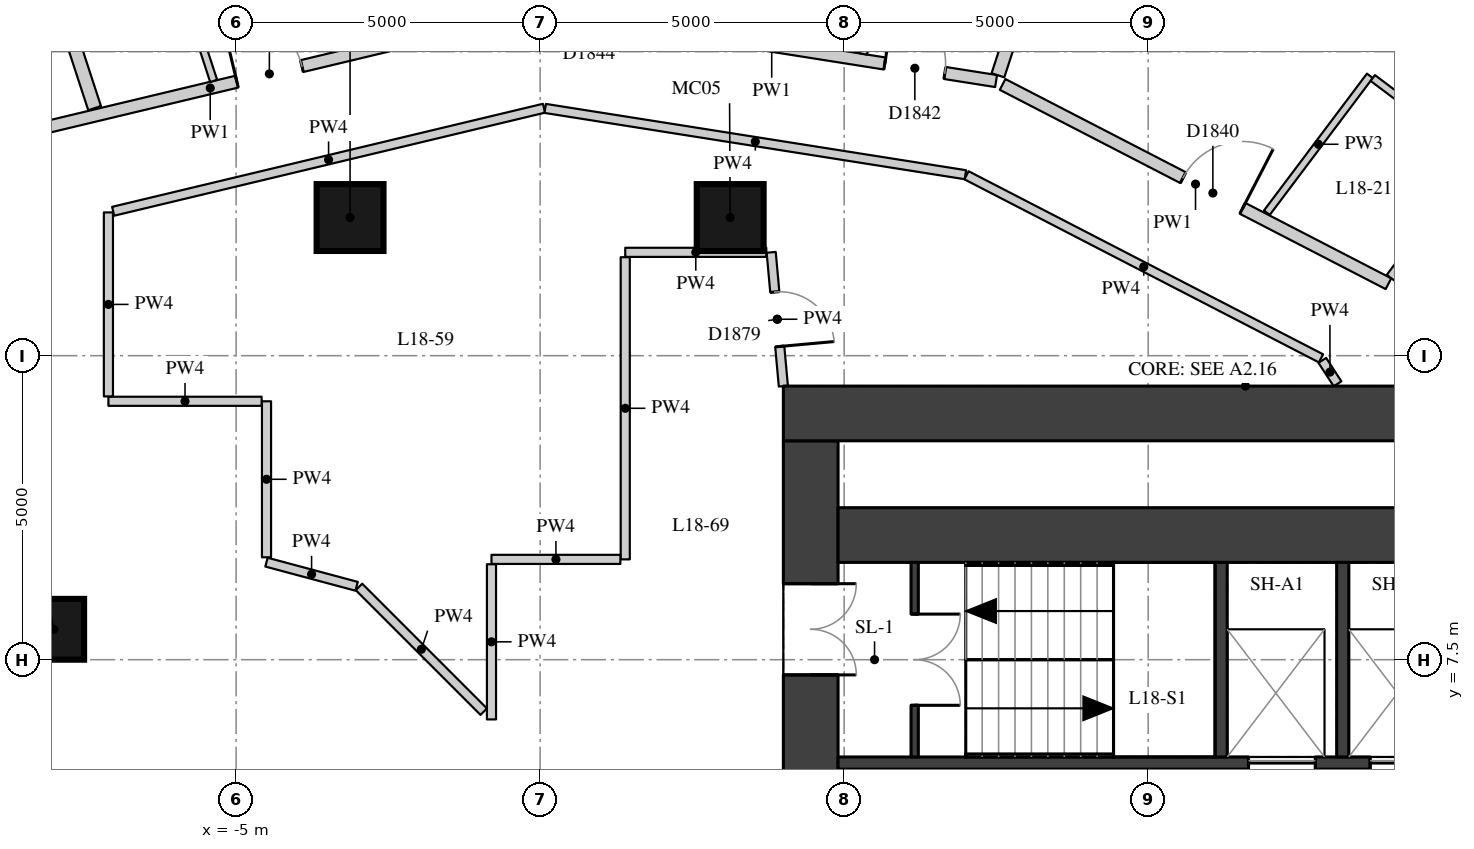
"""IFC4 building model, lengths in metres.
Left out: names, types, materials, properties, quantities, classifications, styles, units other than length and angle.
Written with IfcOpenShell. Run it as: python <this file> out.ifc"""

import sys

from ifc_helpers import new_model, si_unit, direction, frame, frame_2d, origin, origin_2d, place, context, subcontext, project, spatial, rectangle, extrude, element, fill, save


model = new_model("IFC4")
c1 = context("Model", 3, precision=1e-05, world=origin(), true_north=direction((0.0, 1.0)))
c2 = subcontext(c1, "Body", "Model", "MODEL_VIEW")
j1 = project(units=[si_unit("LENGTHUNIT", "METRE"), si_unit("PLANEANGLEUNIT", "RADIAN")], contexts=[c1])
p1 = place(None, origin())
s1 = spatial("IfcSite", under=j1, at=p1, CompositionType="ELEMENT")
p2 = place(p1, origin())
s2 = spatial("IfcBuilding", under=s1, at=p2, CompositionType="ELEMENT")
p3 = place(p2, frame((0.0, 0.0, 67.9)))
s3 = spatial("IfcBuildingStorey", under=s2, at=p3, CompositionType="ELEMENT", Elevation=67.9)
p4 = place(p3, frame((-8.0, 8.0, 0.0), z_axis=(0.0, 0.0, 1.0), x_axis=(1.0, 0.0, 0.0)))
e1 = element("IfcColumn", 1, at=p4, inside=s3, PredefinedType="COLUMN", context=c2, shape_type="SweptSolid", body=[
    extrude(rectangle(XDim=1.0, YDim=1.0, at=origin_2d()), origin(), (0.0, 0.0, 1.0), 3.3),
])
for number, where, z_axis, x_axis in (
    (2, (3.126, 14.772, 0.0), (0.0, 0.0, 1.0), (1.0, 0.0, 0.0)),
    (3, (-3.126, 14.772, 0.0), (0.0, 0.0, 1.0), (1.0, 0.0, 0.0)),
):
    element("IfcColumn", number, at=place(p3, frame(where, z_axis=z_axis, x_axis=x_axis)), inside=s3, PredefinedType="COLUMN", context=c2, shape_type="SweptSolid", body=[
        extrude(rectangle(XDim=1.1, YDim=1.1, at=origin_2d()), origin(), (0.0, 0.0, 1.0), 3.3),
    ])
p5 = place(p3, frame((4.45, -11.1, 0.0), z_axis=(0.0, 0.0, 1.0), x_axis=(0.0, 1.0, 0.0)))
e4 = element("IfcWall", 4, at=p5, inside=s3, PredefinedType="SHEAR", context=c2, shape_type="SweptSolid", body=[
    extrude(rectangle(XDim=22.2, YDim=0.9, at=frame_2d((11.1, 0.0))), origin(), (0.0, 0.0, 1.0), 3.02),
])
p6 = place(p5, frame((2.35, 0.0, 0.0)))
e5 = element("IfcOpeningElement", 5, at=p6, cuts=e4, PredefinedType="OPENING", context=c2, shape_type="SweptSolid", body=[
    extrude(rectangle(XDim=1.5, YDim=2.1, at=frame_2d((0.75, 1.05))), frame((0.0, 0.46, 0.0), z_axis=(0.0, -1.0, 0.0), x_axis=(1.0, 0.0, 0.0)), (0.0, 0.0, 1.0), 0.92),
])
p7 = place(p5, frame((5.45, 0.0, 0.0)))
e6 = element("IfcOpeningElement", 6, at=p7, cuts=e4, PredefinedType="OPENING", context=c2, shape_type="SweptSolid", body=[
    extrude(rectangle(XDim=1.8, YDim=2.1, at=frame_2d((0.9, 1.05))), frame((0.0, 0.46, 0.0), z_axis=(0.0, -1.0, 0.0), x_axis=(1.0, 0.0, 0.0)), (0.0, 0.0, 1.0), 0.92),
])
p8 = place(p5, frame((7.95, 0.0, 0.0)))
e7 = element("IfcOpeningElement", 7, at=p8, cuts=e4, PredefinedType="OPENING", context=c2, shape_type="SweptSolid", body=[
    extrude(rectangle(XDim=1.1, YDim=2.1, at=frame_2d((0.55, 1.05))), frame((0.0, 0.46, 0.0), z_axis=(0.0, -1.0, 0.0), x_axis=(1.0, 0.0, 0.0)), (0.0, 0.0, 1.0), 0.92),
])
p9 = place(p5, frame((10.6, 0.0, 0.0)))
e8 = element("IfcOpeningElement", 8, at=p9, cuts=e4, PredefinedType="OPENING", context=c2, shape_type="SweptSolid", body=[
    extrude(rectangle(XDim=1.0, YDim=2.1, at=frame_2d((0.5, 1.05))), frame((0.0, 0.46, 0.0), z_axis=(0.0, -1.0, 0.0), x_axis=(1.0, 0.0, 0.0)), (0.0, 0.0, 1.0), 0.92),
])
p10 = place(p5, frame((13.15, 0.0, 0.0)))
e9 = element("IfcOpeningElement", 9, at=p10, cuts=e4, PredefinedType="OPENING", context=c2, shape_type="SweptSolid", body=[
    extrude(rectangle(XDim=1.1, YDim=2.1, at=frame_2d((0.55, 1.05))), frame((0.0, 0.46, 0.0), z_axis=(0.0, -1.0, 0.0), x_axis=(1.0, 0.0, 0.0)), (0.0, 0.0, 1.0), 0.92),
])
p11 = place(p5, frame((14.95, 0.0, 0.0)))
e10 = element("IfcOpeningElement", 10, at=p11, cuts=e4, PredefinedType="OPENING", context=c2, shape_type="SweptSolid", body=[
    extrude(rectangle(XDim=1.8, YDim=2.1, at=frame_2d((0.9, 1.05))), frame((0.0, 0.46, 0.0), z_axis=(0.0, -1.0, 0.0), x_axis=(1.0, 0.0, 0.0)), (0.0, 0.0, 1.0), 0.92),
])
p12 = place(p5, frame((18.35, 0.0, 0.0)))
e11 = element("IfcOpeningElement", 11, at=p12, cuts=e4, PredefinedType="OPENING", context=c2, shape_type="SweptSolid", body=[
    extrude(rectangle(XDim=1.5, YDim=2.1, at=frame_2d((0.75, 1.05))), frame((0.0, 0.46, 0.0), z_axis=(0.0, -1.0, 0.0), x_axis=(1.0, 0.0, 0.0)), (0.0, 0.0, 1.0), 0.92),
])
p13 = place(p3, frame((4.0, 11.55, 0.0), z_axis=(0.0, 0.0, 1.0), x_axis=(1.0, 0.0, 0.0)))
e12 = element("IfcWall", 12, at=p13, inside=s3, PredefinedType="SHEAR", context=c2, shape_type="SweptSolid", body=[
    extrude(rectangle(XDim=15.2, YDim=0.9, at=frame_2d((7.6, 0.0))), origin(), (0.0, 0.0, 1.0), 3.02),
])
p14 = place(p3, frame((4.9, 9.55, 0.0), z_axis=(0.0, 0.0, 1.0), x_axis=(1.0, 0.0, 0.0)))
e13 = element("IfcWall", 13, at=p14, inside=s3, PredefinedType="SHEAR", context=c2, shape_type="SweptSolid", body=[
    extrude(rectangle(XDim=10.2, YDim=0.9, at=frame_2d((5.1, 0.0))), origin(), (0.0, 0.0, 1.0), 3.02),
])
p15 = place(p3, frame((4.9, 5.8, 0.0), z_axis=(0.0, 0.0, 1.0), x_axis=(1.0, 0.0, 0.0)))
e14 = element("IfcWall", 14, at=p15, inside=s3, PredefinedType="SHEAR", context=c2, shape_type="SweptSolid", body=[
    extrude(rectangle(XDim=10.2, YDim=0.2, at=frame_2d((5.1, 0.0))), origin(), (0.0, 0.0, 1.0), 3.02),
])
p16 = place(p15, frame((6.75, 0.0, 0.0)))
e15 = element("IfcOpeningElement", 15, at=p16, cuts=e14, PredefinedType="OPENING", context=c2, shape_type="SweptSolid", body=[
    extrude(rectangle(XDim=1.1, YDim=2.1, at=frame_2d((0.55, 1.05))), frame((0.0, 0.11, 0.0), z_axis=(0.0, -1.0, 0.0), x_axis=(1.0, 0.0, 0.0)), (0.0, 0.0, 1.0), 0.22),
])
p17 = place(p15, frame((8.75, 0.0, 0.0)))
e16 = element("IfcOpeningElement", 16, at=p17, cuts=e14, PredefinedType="OPENING", context=c2, shape_type="SweptSolid", body=[
    extrude(rectangle(XDim=1.1, YDim=2.1, at=frame_2d((0.55, 1.05))), frame((0.0, 0.11, 0.0), z_axis=(0.0, -1.0, 0.0), x_axis=(1.0, 0.0, 0.0)), (0.0, 0.0, 1.0), 0.22),
])
for number, where, z_axis, x_axis in (
    (17, (11.2, 5.9, 0.0), (0.0, 0.0, 1.0), (0.0, 1.0, 0.0)),
    (18, (13.2, 5.9, 0.0), (0.0, 0.0, 1.0), (0.0, 1.0, 0.0)),
):
    element("IfcWall", number, at=place(p3, frame(where, z_axis=z_axis, x_axis=x_axis)), inside=s3, PredefinedType="SHEAR", context=c2, shape_type="SweptSolid", body=[
        extrude(rectangle(XDim=3.2, YDim=0.2, at=frame_2d((1.6, 0.0))), origin(), (0.0, 0.0, 1.0), 3.02),
    ])
p18 = place(p3, frame((6.16, 5.9, 0.0), z_axis=(0.0, 0.0, 1.0), x_axis=(0.0, 1.0, 0.0)))
e19 = element("IfcWall", 19, at=p18, inside=s3, PredefinedType="SHEAR", context=c2, shape_type="SweptSolid", body=[
    extrude(rectangle(XDim=3.2, YDim=0.12, at=frame_2d((1.6, 0.0))), origin(), (0.0, 0.0, 1.0), 3.02),
])
p19 = place(p18, frame((0.85, 0.0, 0.0)))
e20 = element("IfcOpeningElement", 20, at=p19, cuts=e19, PredefinedType="OPENING", context=c2, shape_type="SweptSolid", body=[
    extrude(rectangle(XDim=1.5, YDim=2.1, at=frame_2d((0.75, 1.05))), frame((0.0, 0.07, 0.0), z_axis=(0.0, -1.0, 0.0), x_axis=(1.0, 0.0, 0.0)), (0.0, 0.0, 1.0), 0.14),
])
p20 = place(p3, frame((-10.852, 15.605, 0.0), z_axis=(0.0, 0.0, 1.0), x_axis=(0.972573296372, 0.232596610431, 0.0)))
e21 = element("IfcWall", 21, at=p20, inside=s3, PredefinedType="PARTITIONING", context=c2, shape_type="SweptSolid", body=[
    extrude(rectangle(XDim=11.157, YDim=0.2, at=frame_2d((5.579, 0.0))), origin(), (0.0, 0.0, 1.0), 3.02),
])
p21 = place(p20, frame((6.029, 0.0, 0.0)))
e22 = element("IfcOpeningElement", 22, at=p21, cuts=e21, PredefinedType="OPENING", context=c2, shape_type="SweptSolid", body=[
    extrude(rectangle(XDim=1.1, YDim=2.1, at=frame_2d((0.55, 1.05))), frame((0.0, 0.11, 0.0), z_axis=(0.0, -1.0, 0.0), x_axis=(1.0, 0.0, 0.0)), (0.0, 0.0, 1.0), 0.22),
])
p22 = place(p20, frame((0.705, 0.0, 0.0)))
e23 = element("IfcOpeningElement", 23, at=p22, cuts=e21, PredefinedType="OPENING", context=c2, shape_type="SweptSolid", body=[
    extrude(rectangle(XDim=1.0, YDim=2.1, at=frame_2d((0.5, 1.05))), frame((0.0, 0.11, 0.0), z_axis=(0.0, -1.0, 0.0), x_axis=(1.0, 0.0, 0.0)), (0.0, 0.0, 1.0), 0.22),
])
p23 = place(p3, frame((0.119, 18.181, 0.0), z_axis=(0.0, 0.0, 1.0), x_axis=(0.987788122462, -0.155803161464, 0.0)))
e24 = element("IfcWall", 24, at=p23, inside=s3, PredefinedType="PARTITIONING", context=c2, shape_type="SweptSolid", body=[
    extrude(rectangle(XDim=7.471, YDim=0.2, at=frame_2d((3.736, 0.0))), origin(), (0.0, 0.0, 1.0), 3.02),
])
p24 = place(p23, frame((5.619, 0.0, 0.0)))
e25 = element("IfcOpeningElement", 25, at=p24, cuts=e24, PredefinedType="OPENING", context=c2, shape_type="SweptSolid", body=[
    extrude(rectangle(XDim=1.0, YDim=2.1, at=frame_2d((0.5, 1.05))), frame((0.0, 0.11, 0.0), z_axis=(0.0, -1.0, 0.0), x_axis=(1.0, 0.0, 0.0)), (0.0, 0.0, 1.0), 0.22),
])
p25 = place(p23, frame((0.732, 0.0, 0.0)))
e26 = element("IfcOpeningElement", 26, at=p25, cuts=e24, PredefinedType="OPENING", context=c2, shape_type="SweptSolid", body=[
    extrude(rectangle(XDim=1.0, YDim=2.1, at=frame_2d((0.5, 1.05))), frame((0.0, 0.11, 0.0), z_axis=(0.0, -1.0, 0.0), x_axis=(1.0, 0.0, 0.0)), (0.0, 0.0, 1.0), 0.22),
])
p26 = place(p3, frame((7.606, 16.961, 0.0), z_axis=(0.0, 0.0, 1.0), x_axis=(0.888519518851, -0.45883882205, 0.0)))
e27 = element("IfcWall", 27, at=p26, inside=s3, PredefinedType="PARTITIONING", context=c2, shape_type="SweptSolid", body=[
    extrude(rectangle(XDim=7.142, YDim=0.2, at=frame_2d((3.571, 0.0))), origin(), (0.0, 0.0, 1.0), 3.02),
])
p27 = place(p26, frame((3.342, 0.0, 0.0)))
e28 = element("IfcOpeningElement", 28, at=p27, cuts=e27, PredefinedType="OPENING", context=c2, shape_type="SweptSolid", body=[
    extrude(rectangle(XDim=1.1, YDim=2.1, at=frame_2d((0.55, 1.05))), frame((0.0, 0.11, 0.0), z_axis=(0.0, -1.0, 0.0), x_axis=(1.0, 0.0, 0.0)), (0.0, 0.0, 1.0), 0.22),
])
p28 = place(p3, frame((4.0, 11.999, 0.0), z_axis=(0.0, 0.0, 1.0), x_axis=(-0.090475982725, 0.995898637689, 0.0)))
e29 = element("IfcWall", 29, at=p28, inside=s3, PredefinedType="PARTITIONING", context=c2, shape_type="SweptSolid", body=[
    extrude(rectangle(XDim=2.21, YDim=0.15, at=frame_2d((1.105, 0.0))), origin(), (0.0, 0.0, 1.0), 3.02),
])
p29 = place(p28, frame((0.655, 0.0, 0.0)))
e30 = element("IfcOpeningElement", 30, at=p29, cuts=e29, PredefinedType="OPENING", context=c2, shape_type="SweptSolid", body=[
    extrude(rectangle(XDim=0.9, YDim=2.1, at=frame_2d((0.45, 1.05))), frame((0.0, 0.085, 0.0), z_axis=(0.0, -1.0, 0.0), x_axis=(1.0, 0.0, 0.0)), (0.0, 0.0, 1.0), 0.17),
])
p30 = place(p3, frame((3.72, 14.2, 0.0), z_axis=(0.0, 0.0, 1.0), x_axis=(-1.0, 0.0, 0.0)))
e31 = element("IfcWall", 31, at=p30, inside=s3, PredefinedType="PARTITIONING", context=c2, shape_type="SweptSolid", body=[
    extrude(rectangle(XDim=2.32, YDim=0.15, at=frame_2d((1.16, 0.0))), origin(), (0.0, 0.0, 1.0), 3.02),
])
p31 = place(p3, frame((1.4, 14.12, 0.0), z_axis=(0.0, 0.0, 1.0), x_axis=(0.0, -1.0, 0.0)))
e32 = element("IfcWall", 32, at=p31, inside=s3, PredefinedType="PARTITIONING", context=c2, shape_type="SweptSolid", body=[
    extrude(rectangle(XDim=4.97, YDim=0.15, at=frame_2d((2.485, 0.0))), origin(), (0.0, 0.0, 1.0), 3.02),
])
p32 = place(p3, frame((1.32, 9.15, 0.0), z_axis=(0.0, 0.0, 1.0), x_axis=(-1.0, 0.0, 0.0)))
e33 = element("IfcWall", 33, at=p32, inside=s3, PredefinedType="PARTITIONING", context=c2, shape_type="SweptSolid", body=[
    extrude(rectangle(XDim=2.12, YDim=0.15, at=frame_2d((1.06, 0.0))), origin(), (0.0, 0.0, 1.0), 3.02),
])
p33 = place(p3, frame((-0.8, 9.07, 0.0), z_axis=(0.0, 0.0, 1.0), x_axis=(0.0, -1.0, 0.0)))
e34 = element("IfcWall", 34, at=p33, inside=s3, PredefinedType="PARTITIONING", context=c2, shape_type="SweptSolid", body=[
    extrude(rectangle(XDim=2.552, YDim=0.15, at=frame_2d((1.276, 0.0))), origin(), (0.0, 0.0, 1.0), 3.02),
])
p34 = place(p3, frame((-0.927, 6.645, 0.0), z_axis=(0.0, 0.0, 1.0), x_axis=(-0.707106781187, 0.707106781187, 0.0)))
e35 = element("IfcWall", 35, at=p34, inside=s3, PredefinedType="PARTITIONING", context=c2, shape_type="SweptSolid", body=[
    extrude(rectangle(XDim=2.901, YDim=0.15, at=frame_2d((1.451, 0.0))), origin(), (0.0, 0.0, 1.0), 3.02),
])
p35 = place(p3, frame((-3.018, 8.707, 0.0), z_axis=(0.0, 0.0, 1.0), x_axis=(-0.965925329025, 0.25882090091, 0.0)))
e36 = element("IfcWall", 36, at=p35, inside=s3, PredefinedType="PARTITIONING", context=c2, shape_type="SweptSolid", body=[
    extrude(rectangle(XDim=1.535, YDim=0.15, at=frame_2d((0.767, 0.0))), origin(), (0.0, 0.0, 1.0), 3.02),
])
p36 = place(p3, frame((-4.5, 9.184, 0.0), z_axis=(0.0, 0.0, 1.0), x_axis=(0.0, 1.0, 0.0)))
e37 = element("IfcWall", 37, at=p36, inside=s3, PredefinedType="PARTITIONING", context=c2, shape_type="SweptSolid", body=[
    extrude(rectangle(XDim=2.566, YDim=0.15, at=frame_2d((1.283, 0.0))), origin(), (0.0, 0.0, 1.0), 3.02),
])
p37 = place(p3, frame((-4.58, 11.75, 0.0), z_axis=(0.0, 0.0, 1.0), x_axis=(-1.0, 0.0, 0.0)))
e38 = element("IfcWall", 38, at=p37, inside=s3, PredefinedType="PARTITIONING", context=c2, shape_type="SweptSolid", body=[
    extrude(rectangle(XDim=2.52, YDim=0.15, at=frame_2d((1.26, 0.0))), origin(), (0.0, 0.0, 1.0), 3.02),
])
p38 = place(p3, frame((-7.1, 11.83, 0.0), z_axis=(0.0, 0.0, 1.0), x_axis=(0.0, 1.0, 0.0)))
e39 = element("IfcWall", 39, at=p38, inside=s3, PredefinedType="PARTITIONING", context=c2, shape_type="SweptSolid", body=[
    extrude(rectangle(XDim=3.027, YDim=0.15, at=frame_2d((1.513, 0.0))), origin(), (0.0, 0.0, 1.0), 3.02),
])
p39 = place(p3, frame((-7.022, 14.875, 0.0), z_axis=(0.0, 0.0, 1.0), x_axis=(0.972565872543, 0.232627650043, 0.0)))
e40 = element("IfcWall", 40, at=p39, inside=s3, PredefinedType="PARTITIONING", context=c2, shape_type="SweptSolid", body=[
    extrude(rectangle(XDim=7.286, YDim=0.15, at=frame_2d((3.643, 0.0))), origin(), (0.0, 0.0, 1.0), 3.02),
])
p40 = place(p3, frame((0.083, 16.567, 0.0), z_axis=(0.0, 0.0, 1.0), x_axis=(0.987781067139, -0.15584788546, 0.0)))
e41 = element("IfcWall", 41, at=p40, inside=s3, PredefinedType="PARTITIONING", context=c2, shape_type="SweptSolid", body=[
    extrude(rectangle(XDim=6.996, YDim=0.15, at=frame_2d((3.498, 0.0))), origin(), (0.0, 0.0, 1.0), 3.02),
])
p41 = place(p3, frame((7.012, 15.467, 0.0), z_axis=(0.0, 0.0, 1.0), x_axis=(0.888509096081, -0.458859004685, 0.0)))
e42 = element("IfcWall", 42, at=p41, inside=s3, PredefinedType="PARTITIONING", context=c2, shape_type="SweptSolid", body=[
    extrude(rectangle(XDim=6.561, YDim=0.15, at=frame_2d((3.281, 0.0))), origin(), (0.0, 0.0, 1.0), 3.02),
])
p42 = place(p3, frame((12.864, 12.423, 0.0), z_axis=(0.0, 0.0, 1.0), x_axis=(0.545733799108, -0.837958603101, 0.0)))
e43 = element("IfcWall", 43, at=p42, inside=s3, PredefinedType="PARTITIONING", context=c2, shape_type="SweptSolid", body=[
    extrude(rectangle(XDim=0.46, YDim=0.15, at=frame_2d((0.23, 0.0))), origin(), (0.0, 0.0, 1.0), 3.02),
])
p43 = place(p3, frame((16.927, 17.638, 0.0), z_axis=(0.0, 0.0, 1.0), x_axis=(-0.601159395391, -0.799129139334, 0.0)))
e44 = element("IfcWall", 44, at=p43, inside=s3, PredefinedType="PARTITIONING", context=c2, shape_type="SweptSolid", body=[
    extrude(rectangle(XDim=4.849, YDim=0.22, at=frame_2d((2.425, 0.0))), origin(), (0.0, 0.0, 1.0), 3.02),
])
p44 = place(p3, frame((9.034, 21.721, 0.0), z_axis=(0.0, 0.0, 1.0), x_axis=(-0.310330277344, -0.95062880188, 0.0)))
e45 = element("IfcWall", 45, at=p44, inside=s3, PredefinedType="PARTITIONING", context=c2, shape_type="SweptSolid", body=[
    extrude(rectangle(XDim=4.848, YDim=0.22, at=frame_2d((2.424, 0.0))), origin(), (0.0, 0.0, 1.0), 3.02),
])
p45 = place(p3, frame((-9.429, 23.014, 0.0), z_axis=(0.0, 0.0, 1.0), x_axis=(0.310223739243, -0.950663574357, 0.0)))
e46 = element("IfcWall", 46, at=p45, inside=s3, PredefinedType="PARTITIONING", context=c2, shape_type="SweptSolid", body=[
    extrude(rectangle(XDim=6.778, YDim=0.22, at=frame_2d((3.389, 0.0))), origin(), (0.0, 0.0, 1.0), 3.02),
])
p46 = place(p3, frame((11.952, 14.852, 0.0), z_axis=(0.0, 0.0, 1.0), x_axis=(0.60115003842, 0.7991361782, 0.0)))
e47 = element("IfcWall", 47, at=p46, inside=s3, PredefinedType="PARTITIONING", context=c2, shape_type="SweptSolid", body=[
    extrude(rectangle(XDim=2.818, YDim=0.12, at=frame_2d((1.409, 0.0))), origin(), (0.0, 0.0, 1.0), 3.02),
])
p47 = place(p3, frame((5.318, 17.462, 0.0), z_axis=(0.0, 0.0, 1.0), x_axis=(0.156077517275, 0.987744809453, 0.0)))
e48 = element("IfcWall", 48, at=p47, inside=s3, PredefinedType="PARTITIONING", context=c2, shape_type="SweptSolid", body=[
    extrude(rectangle(XDim=2.399, YDim=0.12, at=frame_2d((1.2, 0.0))), origin(), (0.0, 0.0, 1.0), 3.02),
])
p48 = place(p3, frame((-5.369, 17.019, 0.0), z_axis=(0.0, 0.0, 1.0), x_axis=(-0.310231838646, 0.950660931295, 0.0)))
e49 = element("IfcWall", 49, at=p48, inside=s3, PredefinedType="PARTITIONING", context=c2, shape_type="SweptSolid", body=[
    extrude(rectangle(XDim=2.861, YDim=0.12, at=frame_2d((1.431, 0.0))), origin(), (0.0, 0.0, 1.0), 3.02),
])
p49 = place(p3, frame((13.694, 17.067, 0.0), z_axis=(0.0, 0.0, 1.0), x_axis=(0.799118870394, -0.601173045786, 0.0)))
e50 = element("IfcWall", 50, at=p49, inside=s3, PredefinedType="PARTITIONING", context=c2, shape_type="SweptSolid", body=[
    extrude(rectangle(XDim=2.13, YDim=0.12, at=frame_2d((1.065, 0.0))), origin(), (0.0, 0.0, 1.0), 3.02),
])
p50 = place(p49, frame((0.59, 0.0, 0.0)))
e51 = element("IfcOpeningElement", 51, at=p50, cuts=e50, PredefinedType="OPENING", context=c2, shape_type="SweptSolid", body=[
    extrude(rectangle(XDim=1.0, YDim=2.1, at=frame_2d((0.5, 1.05))), frame((0.0, 0.07, 0.0), z_axis=(0.0, -1.0, 0.0), x_axis=(1.0, 0.0, 0.0)), (0.0, 0.0, 1.0), 0.14),
])
p51 = place(p12, origin())
e52 = element("IfcDoor", 52, at=p51, inside=s3, OperationType="DOUBLE_DOOR_SINGLE_SWING", PredefinedType="DOOR", context=c2, shape_type="SweptSolid", body=[
    extrude(rectangle(XDim=1.5, YDim=2.1, at=frame_2d((0.75, 1.05))), frame((0.0, 0.025, 0.0), z_axis=(0.0, -1.0, 0.0), x_axis=(1.0, 0.0, 0.0)), (0.0, 0.0, 1.0), 0.05),
])
fill(e11, e52)
p52 = place(p19, origin())
e53 = element("IfcDoor", 53, at=p52, inside=s3, OperationType="DOUBLE_DOOR_SINGLE_SWING", PredefinedType="DOOR", context=c2, shape_type="SweptSolid", body=[
    extrude(rectangle(XDim=1.5, YDim=2.1, at=frame_2d((0.75, 1.05))), frame((0.0, 0.025, 0.0), z_axis=(0.0, -1.0, 0.0), x_axis=(1.0, 0.0, 0.0)), (0.0, 0.0, 1.0), 0.05),
])
fill(e20, e53)
p53 = place(p16, origin())
e54 = element("IfcDoor", 54, at=p53, inside=s3, OperationType="DOUBLE_DOOR_SLIDING", PredefinedType="DOOR", context=c2, shape_type="SweptSolid", body=[
    extrude(rectangle(XDim=1.1, YDim=2.1, at=frame_2d((0.55, 1.05))), frame((0.0, 0.025, 0.0), z_axis=(0.0, -1.0, 0.0), x_axis=(1.0, 0.0, 0.0)), (0.0, 0.0, 1.0), 0.05),
])
fill(e15, e54)
p54 = place(p17, origin())
e55 = element("IfcDoor", 55, at=p54, inside=s3, OperationType="DOUBLE_DOOR_SLIDING", PredefinedType="DOOR", context=c2, shape_type="SweptSolid", body=[
    extrude(rectangle(XDim=1.1, YDim=2.1, at=frame_2d((0.55, 1.05))), frame((0.0, 0.025, 0.0), z_axis=(0.0, -1.0, 0.0), x_axis=(1.0, 0.0, 0.0)), (0.0, 0.0, 1.0), 0.05),
])
fill(e16, e55)
p55 = place(p27, origin())
e56 = element("IfcDoor", 56, at=p55, inside=s3, OperationType="SINGLE_SWING_RIGHT", PredefinedType="DOOR", context=c2, shape_type="SweptSolid", body=[
    extrude(rectangle(XDim=1.1, YDim=2.1, at=frame_2d((0.55, 1.05))), frame((0.0, 0.025, 0.0), z_axis=(0.0, -1.0, 0.0), x_axis=(1.0, 0.0, 0.0)), (0.0, 0.0, 1.0), 0.05),
])
fill(e28, e56)
p56 = place(p24, origin())
e57 = element("IfcDoor", 57, at=p56, inside=s3, OperationType="SINGLE_SWING_LEFT", PredefinedType="DOOR", context=c2, shape_type="SweptSolid", body=[
    extrude(rectangle(XDim=1.0, YDim=2.1, at=frame_2d((0.5, 1.05))), frame((0.0, 0.025, 0.0), z_axis=(0.0, -1.0, 0.0), x_axis=(1.0, 0.0, 0.0)), (0.0, 0.0, 1.0), 0.05),
])
fill(e25, e57)
p57 = place(p21, origin())
e58 = element("IfcDoor", 58, at=p57, inside=s3, OperationType="SINGLE_SWING_LEFT", PredefinedType="DOOR", context=c2, shape_type="SweptSolid", body=[
    extrude(rectangle(XDim=1.1, YDim=2.1, at=frame_2d((0.55, 1.05))), frame((0.0, 0.025, 0.0), z_axis=(0.0, -1.0, 0.0), x_axis=(1.0, 0.0, 0.0)), (0.0, 0.0, 1.0), 0.05),
])
fill(e22, e58)
p58 = place(p29, origin())
e59 = element("IfcDoor", 59, at=p58, inside=s3, OperationType="SINGLE_SWING_RIGHT", PredefinedType="DOOR", context=c2, shape_type="SweptSolid", body=[
    extrude(rectangle(XDim=0.9, YDim=2.1, at=frame_2d((0.45, 1.05))), frame((0.0, 0.025, 0.0), z_axis=(0.0, -1.0, 0.0), x_axis=(1.0, 0.0, 0.0)), (0.0, 0.0, 1.0), 0.05),
])
fill(e30, e59)
save(model, sys.argv[1])
